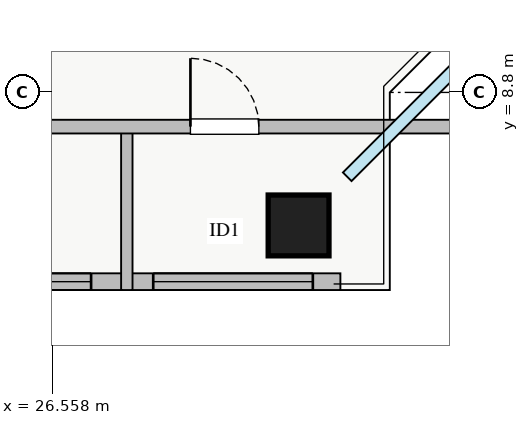
"""IFC4 building model, lengths in metres.
Left out: names, types, materials, properties, quantities, classifications, styles, units other than length and angle.
Written with IfcOpenShell. Run it as: python <this file> out.ifc"""

import sys

from ifc_helpers import new_model, si_unit, direction, frame, frame_2d, origin, origin_2d, place, context, subcontext, project, spatial, rectangle, extrude, source, transform, mapped, element, fill, save


model = new_model("IFC4")
c1 = context("Model", 3, precision=1e-05, world=origin(), true_north=direction((0.0, 1.0)))
c2 = subcontext(c1, "Body", "Model", "MODEL_VIEW")
j1 = project(units=[si_unit("LENGTHUNIT", "METRE"), si_unit("PLANEANGLEUNIT", "RADIAN")], contexts=[c1])
p1 = place(None, origin())
s1 = spatial("IfcSite", under=j1, at=p1, CompositionType="ELEMENT")
p2 = place(p1, origin())
s2 = spatial("IfcBuilding", under=s1, at=p2, CompositionType="ELEMENT")
p3 = place(p2, frame((0.0, 0.0, 197.0)))
s3 = spatial("IfcBuildingStorey", under=s2, at=p3, CompositionType="ELEMENT", Elevation=197.0)
m1 = source(origin(), c2, "Body", "SweptSolid", [
    extrude(rectangle(XDim=0.8, YDim=0.8, at=origin_2d()), origin(), (0.0, 0.0, 1.0), 3.25),
])
p4 = place(p3, frame((29.8, 7.05, 0.0), z_axis=(0.0, 0.0, 1.0), x_axis=(1.0, 0.0, 0.0)))
e1 = element("IfcColumn", 1, at=p4, inside=s3, PredefinedType="COLUMN", context=c2, shape_type="MappedRepresentation", body=[
    mapped(m1, transform((0.0, 0.0, 0.0), x_axis=(1.0, 0.0, 0.0), y_axis=(0.0, 1.0, 0.0), z_axis=(0.0, 0.0, 1.0), scale=1.0)),
])
p5 = place(p3, frame((7.65, 6.31, 0.0), z_axis=(0.0, 0.0, 1.0), x_axis=(1.0, 0.0, 0.0)))
e2 = element("IfcWall", 2, at=p5, inside=s3, PredefinedType="STANDARD", context=c2, shape_type="SweptSolid", body=[
    extrude(rectangle(XDim=22.7, YDim=0.22, at=frame_2d((11.35, 0.0))), origin(), (0.0, 0.0, 1.0), 2.61),
])
p6 = place(p5, frame((12.2, 0.0, 0.0)))
e3 = element("IfcOpeningElement", 3, at=p6, cuts=e2, PredefinedType="OPENING", context=c2, shape_type="SweptSolid", body=[
    extrude(rectangle(XDim=1.2, YDim=2.1, at=frame_2d((0.6, 1.05))), frame((0.0, 0.12, 0.0), z_axis=(0.0, -1.0, 0.0), x_axis=(1.0, 0.0, 0.0)), (0.0, 0.0, 1.0), 0.24),
])
p7 = place(p5, frame((1.637, 0.0, 0.9)))
e4 = element("IfcOpeningElement", 4, at=p7, cuts=e2, PredefinedType="OPENING", context=c2, shape_type="SweptSolid", body=[
    extrude(rectangle(XDim=2.4, YDim=1.48, at=frame_2d((1.2, 0.74))), frame((0.0, 0.12, 0.0), z_axis=(0.0, -1.0, 0.0), x_axis=(1.0, 0.0, 0.0)), (0.0, 0.0, 1.0), 0.24),
])
p8 = place(p5, frame((7.612, 0.0, 0.9)))
e5 = element("IfcOpeningElement", 5, at=p8, cuts=e2, PredefinedType="OPENING", context=c2, shape_type="SweptSolid", body=[
    extrude(rectangle(XDim=1.8, YDim=1.45, at=frame_2d((0.9, 0.725))), frame((0.0, 0.12, 0.0), z_axis=(0.0, -1.0, 0.0), x_axis=(1.0, 0.0, 0.0)), (0.0, 0.0, 1.0), 0.24),
])
p9 = place(p5, frame((20.238, 0.0, 0.9)))
e6 = element("IfcOpeningElement", 6, at=p9, cuts=e2, PredefinedType="OPENING", context=c2, shape_type="SweptSolid", body=[
    extrude(rectangle(XDim=2.1, YDim=1.5, at=frame_2d((1.05, 0.75))), frame((0.0, 0.12, 0.0), z_axis=(0.0, -1.0, 0.0), x_axis=(1.0, 0.0, 0.0)), (0.0, 0.0, 1.0), 0.24),
])
p10 = place(p5, frame((17.02, 0.0, 0.9)))
e7 = element("IfcOpeningElement", 7, at=p10, cuts=e2, PredefinedType="OPENING", context=c2, shape_type="SweptSolid", body=[
    extrude(rectangle(XDim=2.4, YDim=1.5, at=frame_2d((1.2, 0.75))), frame((0.0, 0.12, 0.0), z_axis=(0.0, -1.0, 0.0), x_axis=(1.0, 0.0, 0.0)), (0.0, 0.0, 1.0), 0.24),
])
p11 = place(p3, frame((27.54, 6.2, 0.0), z_axis=(0.0, 0.0, 1.0), x_axis=(0.0, 1.0, 0.0)))
e8 = element("IfcWall", 8, at=p11, inside=s3, PredefinedType="PARTITIONING", context=c2, shape_type="SweptSolid", body=[
    extrude(rectangle(XDim=2.15, YDim=0.15, at=frame_2d((1.075, 0.0))), origin(), (0.0, 0.0, 1.0), 3.07),
])
p12 = place(p3, frame((24.2, 8.35, 0.0), z_axis=(0.0, 0.0, 1.0), x_axis=(1.0, 0.0, 0.0)))
e9 = element("IfcWall", 9, at=p12, inside=s3, PredefinedType="PARTITIONING", context=c2, shape_type="SweptSolid", body=[
    extrude(rectangle(XDim=8.25, YDim=0.18, at=frame_2d((4.125, 0.0))), origin(), (0.0, 0.0, 1.0), 3.07),
])
p13 = place(p12, frame((1.22, 0.0, 0.0)))
e10 = element("IfcOpeningElement", 10, at=p13, cuts=e9, PredefinedType="OPENING", context=c2, shape_type="SweptSolid", body=[
    extrude(rectangle(XDim=0.9, YDim=2.05, at=frame_2d((0.45, 1.025))), frame((0.0, 0.1, 0.0), z_axis=(0.0, -1.0, 0.0), x_axis=(1.0, 0.0, 0.0)), (0.0, 0.0, 1.0), 0.2),
])
p14 = place(p12, frame((4.177, 0.0, 0.0)))
e11 = element("IfcOpeningElement", 11, at=p14, cuts=e9, PredefinedType="OPENING", context=c2, shape_type="SweptSolid", body=[
    extrude(rectangle(XDim=0.9, YDim=2.05, at=frame_2d((0.45, 1.025))), frame((0.0, 0.1, 0.0), z_axis=(0.0, -1.0, 0.0), x_axis=(1.0, 0.0, 0.0)), (0.0, 0.0, 1.0), 0.2),
])
m2 = source(origin(), c2, "Body", "SweptSolid", [
    extrude(rectangle(XDim=2.1, YDim=1.5, at=frame_2d((1.05, 0.75))), frame((0.0, 0.03, 0.0), z_axis=(0.0, -1.0, 0.0), x_axis=(1.0, 0.0, 0.0)), (0.0, 0.0, 1.0), 0.06),
])
p15 = place(p9, origin())
e12 = element("IfcWindow", 12, at=p15, inside=s3, PartitioningType="TRIPLE_PANEL_VERTICAL", PredefinedType="WINDOW", context=c2, shape_type="MappedRepresentation", body=[
    mapped(m2, transform((0.0, 0.0, 0.0), x_axis=(1.0, 0.0, 0.0), y_axis=(0.0, 1.0, 0.0), z_axis=(0.0, 0.0, 1.0), scale=1.0)),
])
fill(e6, e12)
m3 = source(origin(), c2, "Body", "SweptSolid", [
    extrude(rectangle(XDim=0.9, YDim=2.05, at=frame_2d((0.45, 1.025))), frame((0.0, 0.025, 0.0), z_axis=(0.0, -1.0, 0.0), x_axis=(1.0, 0.0, 0.0)), (0.0, 0.0, 1.0), 0.05),
])
p16 = place(p14, origin())
e13 = element("IfcDoor", 13, at=p16, inside=s3, OperationType="SINGLE_SWING_LEFT", PredefinedType="DOOR", context=c2, shape_type="MappedRepresentation", body=[
    mapped(m3, transform((0.0, 0.0, 0.0), x_axis=(1.0, 0.0, 0.0), y_axis=(0.0, 1.0, 0.0), z_axis=(0.0, 0.0, 1.0), scale=1.0)),
])
fill(e11, e13)
m4 = source(origin(), c2, "Body", "SweptSolid", [
    extrude(rectangle(XDim=2.4, YDim=1.5, at=frame_2d((1.2, 0.75))), frame((0.0, 0.03, 0.0), z_axis=(0.0, -1.0, 0.0), x_axis=(1.0, 0.0, 0.0)), (0.0, 0.0, 1.0), 0.06),
])
p17 = place(p10, origin())
e14 = element("IfcWindow", 14, at=p17, inside=s3, PartitioningType="TRIPLE_PANEL_VERTICAL", PredefinedType="WINDOW", context=c2, shape_type="MappedRepresentation", body=[
    mapped(m4, transform((0.0, 0.0, 0.0), x_axis=(1.0, 0.0, 0.0), y_axis=(0.0, 1.0, 0.0), z_axis=(0.0, 0.0, 1.0), scale=1.0)),
])
fill(e7, e14)
save(model, sys.argv[1])
